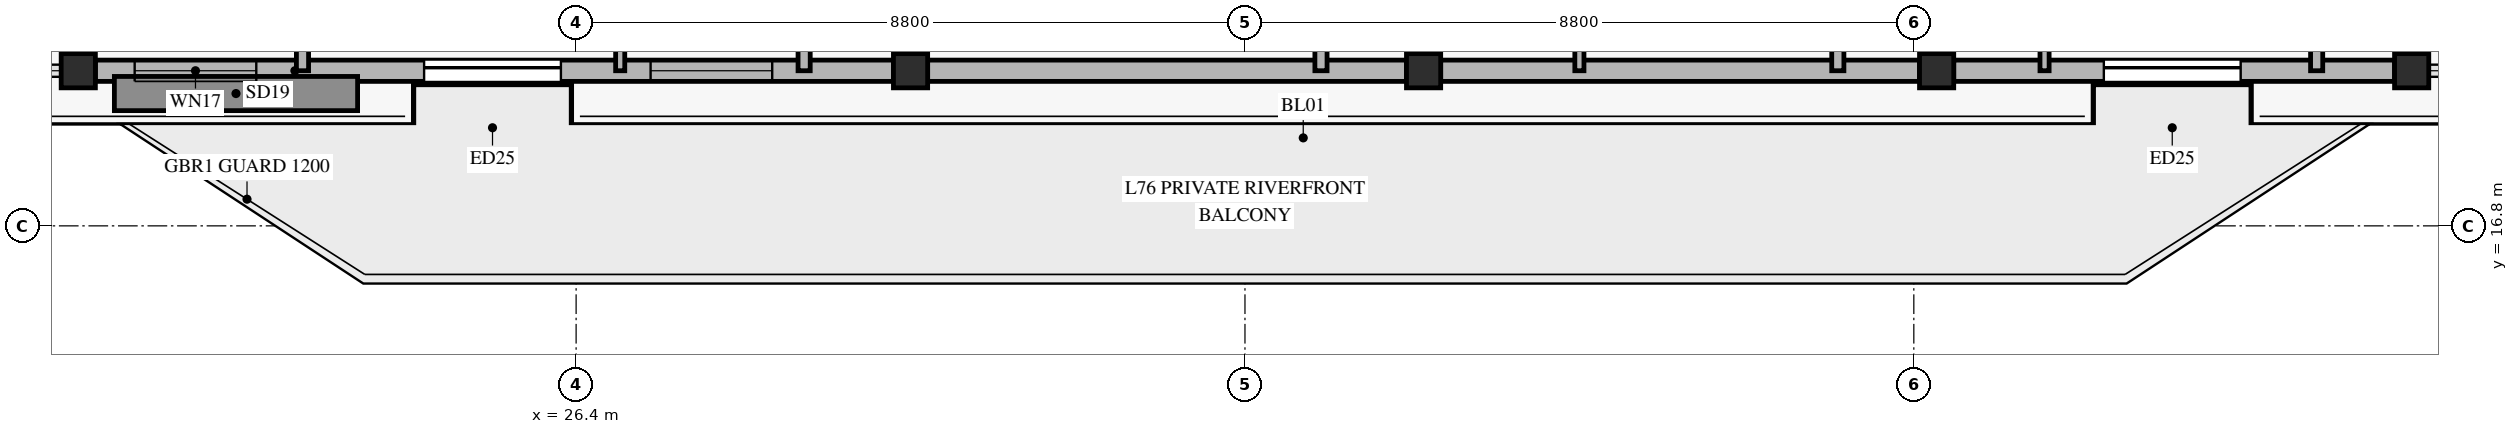
"""IFC4 building model, lengths in metres.
Left out: names, types, materials, properties, quantities, classifications, styles, units other than length and angle.
Written with IfcOpenShell. Run it as: python <this file> out.ifc"""

import sys

from ifc_helpers import new_model, si_unit, direction, frame, frame_2d, origin, origin_2d, place, context, subcontext, project, spatial, rectangle, hollow_rectangle, extrude, source, transform, mapped, element, fill, save


model = new_model("IFC4")
c1 = context("Model", 3, precision=1e-05, world=origin(), true_north=direction((0.0, 1.0)))
c2 = subcontext(c1, "Body", "Model", "MODEL_VIEW")
j1 = project(units=[si_unit("LENGTHUNIT", "METRE"), si_unit("PLANEANGLEUNIT", "RADIAN")], contexts=[c1])
p1 = place(None, origin())
s1 = spatial("IfcSite", under=j1, at=p1, CompositionType="ELEMENT")
p2 = place(p1, origin())
s2 = spatial("IfcBuilding", under=s1, at=p2, CompositionType="ELEMENT")
p3 = place(p2, frame((0.0, 0.0, 297.2)))
s3 = spatial("IfcBuildingStorey", under=s2, at=p3, CompositionType="ELEMENT", Elevation=297.2)
m1 = source(origin(), c2, "Body", "SweptSolid", [
    extrude(hollow_rectangle(XDim=0.45, YDim=0.45, WallThickness=0.022, at=origin_2d()), origin(), (0.0, 0.0, 1.0), 3.185),
])
for number, where, z_axis, x_axis in (
    (1, (19.85, 18.841, 0.0), (0.0, 0.0, 1.0), (1.0, 0.0, 0.0)),
    (2, (30.8, 18.841, 0.0), (0.0, 0.0, 1.0), (1.0, 0.0, 0.0)),
    (3, (37.55, 18.841, 0.0), (0.0, 0.0, 1.0), (1.0, 0.0, 0.0)),
    (4, (44.3, 18.841, 0.0), (0.0, 0.0, 1.0), (1.0, 0.0, 0.0)),
    (5, (50.55, 18.841, 0.0), (0.0, 0.0, 1.0), (1.0, 0.0, 0.0)),
):
    element("IfcColumn", number, at=place(p3, frame(where, z_axis=z_axis, x_axis=x_axis)), inside=s3, PredefinedType="COLUMN", context=c2, shape_type="MappedRepresentation", body=[
        mapped(m1, transform((0.0, 0.0, 0.0), x_axis=(1.0, 0.0, 0.0), y_axis=(0.0, 1.0, 0.0), z_axis=(0.0, 0.0, 1.0), scale=1.0)),
    ])
p4 = place(p3, frame((20.075, 18.841, 0.0), z_axis=(0.0, 0.0, 1.0), x_axis=(1.0, 0.0, 0.0)))
e6 = element("IfcWall", 6, at=p4, inside=s3, PredefinedType="SOLIDWALL", context=c2, shape_type="SweptSolid", body=[
    extrude(rectangle(XDim=10.5, YDim=0.28, at=frame_2d((5.25, 0.0))), origin(), (0.0, 0.0, 1.0), 2.815),
])
p5 = place(p4, frame((4.325, 0.0, 0.0)))
e7 = element("IfcOpeningElement", 7, at=p5, cuts=e6, PredefinedType="OPENING", context=c2, shape_type="SweptSolid", body=[
    extrude(rectangle(XDim=1.8, YDim=2.25, at=frame_2d((0.9, 1.125))), frame((0.0, 0.15, 0.0), z_axis=(0.0, -1.0, 0.0), x_axis=(1.0, 0.0, 0.0)), (0.0, 0.0, 1.0), 0.3),
])
p6 = place(p4, frame((0.517, 0.0, 0.45)))
e8 = element("IfcOpeningElement", 8, at=p6, cuts=e6, PredefinedType="OPENING", context=c2, shape_type="SweptSolid", body=[
    extrude(rectangle(XDim=1.6, YDim=2.0, at=frame_2d((0.8, 1.0))), frame((0.0, 0.15, 0.0), z_axis=(0.0, -1.0, 0.0), x_axis=(1.0, 0.0, 0.0)), (0.0, 0.0, 1.0), 0.3),
])
p7 = place(p4, frame((7.305, 0.0, 0.45)))
e9 = element("IfcOpeningElement", 9, at=p7, cuts=e6, PredefinedType="OPENING", context=c2, shape_type="SweptSolid", body=[
    extrude(rectangle(XDim=1.6, YDim=2.0, at=frame_2d((0.8, 1.0))), frame((0.0, 0.15, 0.0), z_axis=(0.0, -1.0, 0.0), x_axis=(1.0, 0.0, 0.0)), (0.0, 0.0, 1.0), 0.3),
])
for number, where, z_axis, x_axis in (
    (10, (31.025, 18.841, 0.0), (0.0, 0.0, 1.0), (1.0, 0.0, 0.0)),
    (11, (37.775, 18.841, 0.0), (0.0, 0.0, 1.0), (1.0, 0.0, 0.0)),
):
    element("IfcWall", number, at=place(p3, frame(where, z_axis=z_axis, x_axis=x_axis)), inside=s3, PredefinedType="SOLIDWALL", context=c2, shape_type="SweptSolid", body=[
        extrude(rectangle(XDim=6.3, YDim=0.28, at=frame_2d((3.15, 0.0))), origin(), (0.0, 0.0, 1.0), 2.815),
    ])
p8 = place(p3, frame((44.525, 18.841, 0.0), z_axis=(0.0, 0.0, 1.0), x_axis=(1.0, 0.0, 0.0)))
e12 = element("IfcWall", 12, at=p8, inside=s3, PredefinedType="SOLIDWALL", context=c2, shape_type="SweptSolid", body=[
    extrude(rectangle(XDim=5.8, YDim=0.28, at=frame_2d((2.9, 0.0))), origin(), (0.0, 0.0, 1.0), 2.815),
])
p9 = place(p8, frame((1.975, 0.0, 0.0)))
e13 = element("IfcOpeningElement", 13, at=p9, cuts=e12, PredefinedType="OPENING", context=c2, shape_type="SweptSolid", body=[
    extrude(rectangle(XDim=1.8, YDim=2.25, at=frame_2d((0.9, 1.125))), frame((0.0, 0.15, 0.0), z_axis=(0.0, -1.0, 0.0), x_axis=(1.0, 0.0, 0.0)), (0.0, 0.0, 1.0), 0.3),
])
for number, where, z_axis, x_axis in (
    (14, (22.8, 18.841, 0.0), (0.0, 0.0, 1.0), (0.0, 1.0, 0.0)),
    (15, (29.4, 18.841, 0.0), (0.0, 0.0, 1.0), (0.0, 1.0, 0.0)),
    (16, (36.2, 18.841, 0.0), (0.0, 0.0, 1.0), (0.0, 1.0, 0.0)),
    (17, (43.0, 18.841, 0.0), (0.0, 0.0, 1.0), (0.0, 1.0, 0.0)),
    (18, (49.3, 18.841, 0.0), (0.0, 0.0, 1.0), (0.0, 1.0, 0.0)),
):
    element("IfcWall", number, at=place(p3, frame(where, z_axis=z_axis, x_axis=x_axis)), inside=s3, PredefinedType="PARTITIONING", context=c2, shape_type="SweptSolid", body=[
        extrude(rectangle(XDim=15.509, YDim=0.16, at=frame_2d((7.754, 0.0))), origin(), (0.0, 0.0, 1.0), 2.77),
    ])
p10 = place(p3, frame((26.98, 18.841, 0.0), z_axis=(0.0, 0.0, 1.0), x_axis=(0.0, 1.0, 0.0)))
e19 = element("IfcWall", 19, at=p10, inside=s3, PredefinedType="PARTITIONING", context=c2, shape_type="SweptSolid", body=[
    extrude(rectangle(XDim=12.859, YDim=0.12, at=frame_2d((6.429, 0.0))), origin(), (0.0, 0.0, 1.0), 2.77),
])
p11 = place(p10, frame((0.8, 0.0, 0.0)))
e20 = element("IfcOpeningElement", 20, at=p11, cuts=e19, PredefinedType="OPENING", context=c2, shape_type="SweptSolid", body=[
    extrude(rectangle(XDim=0.95, YDim=2.1, at=frame_2d((0.475, 1.05))), frame((0.0, 0.07, 0.0), z_axis=(0.0, -1.0, 0.0), x_axis=(1.0, 0.0, 0.0)), (0.0, 0.0, 1.0), 0.14),
])
p12 = place(p3, frame((39.6, 18.841, 0.0), z_axis=(0.0, 0.0, 1.0), x_axis=(0.0, 1.0, 0.0)))
e21 = element("IfcWall", 21, at=p12, inside=s3, PredefinedType="PARTITIONING", context=c2, shape_type="SweptSolid", body=[
    extrude(rectangle(XDim=12.859, YDim=0.12, at=frame_2d((6.429, 0.0))), origin(), (0.0, 0.0, 1.0), 2.77),
])
p13 = place(p12, frame((1.59, 0.0, 0.0)))
e22 = element("IfcOpeningElement", 22, at=p13, cuts=e21, PredefinedType="OPENING", context=c2, shape_type="SweptSolid", body=[
    extrude(rectangle(XDim=0.95, YDim=2.1, at=frame_2d((0.475, 1.05))), frame((0.0, 0.07, 0.0), z_axis=(0.0, -1.0, 0.0), x_axis=(1.0, 0.0, 0.0)), (0.0, 0.0, 1.0), 0.14),
])
p14 = place(p12, frame((9.299, 0.0, 0.0)))
e23 = element("IfcOpeningElement", 23, at=p14, cuts=e21, PredefinedType="OPENING", context=c2, shape_type="SweptSolid", body=[
    extrude(rectangle(XDim=0.95, YDim=2.1, at=frame_2d((0.475, 1.05))), frame((0.0, 0.07, 0.0), z_axis=(0.0, -1.0, 0.0), x_axis=(1.0, 0.0, 0.0)), (0.0, 0.0, 1.0), 0.14),
])
p15 = place(p3, frame((45.72, 18.841, 0.0), z_axis=(0.0, 0.0, 1.0), x_axis=(0.0, 1.0, 0.0)))
e24 = element("IfcWall", 24, at=p15, inside=s3, PredefinedType="PARTITIONING", context=c2, shape_type="SweptSolid", body=[
    extrude(rectangle(XDim=12.859, YDim=0.12, at=frame_2d((6.429, 0.0))), origin(), (0.0, 0.0, 1.0), 2.77),
])
p16 = place(p15, frame((0.67, 0.0, 0.0)))
e25 = element("IfcOpeningElement", 25, at=p16, cuts=e24, PredefinedType="OPENING", context=c2, shape_type="SweptSolid", body=[
    extrude(rectangle(XDim=0.95, YDim=2.1, at=frame_2d((0.475, 1.05))), frame((0.0, 0.07, 0.0), z_axis=(0.0, -1.0, 0.0), x_axis=(1.0, 0.0, 0.0)), (0.0, 0.0, 1.0), 0.14),
])
p17 = place(p15, frame((9.299, 0.0, 0.0)))
e26 = element("IfcOpeningElement", 26, at=p17, cuts=e24, PredefinedType="OPENING", context=c2, shape_type="SweptSolid", body=[
    extrude(rectangle(XDim=0.95, YDim=2.1, at=frame_2d((0.475, 1.05))), frame((0.0, 0.07, 0.0), z_axis=(0.0, -1.0, 0.0), x_axis=(1.0, 0.0, 0.0)), (0.0, 0.0, 1.0), 0.14),
])
m2 = source(origin(), c2, "Body", "SweptSolid", [
    extrude(rectangle(XDim=1.8, YDim=2.25, at=frame_2d((0.9, 1.125))), frame((0.0, 0.025, 0.0), z_axis=(0.0, -1.0, 0.0), x_axis=(1.0, 0.0, 0.0)), (0.0, 0.0, 1.0), 0.05),
])
p18 = place(p5, origin())
e27 = element("IfcDoor", 27, at=p18, inside=s3, OperationType="SLIDING_TO_LEFT", PredefinedType="DOOR", context=c2, shape_type="MappedRepresentation", body=[
    mapped(m2, transform((0.0, 0.0, 0.0), x_axis=(1.0, 0.0, 0.0), y_axis=(0.0, 1.0, 0.0), z_axis=(0.0, 0.0, 1.0), scale=1.0)),
])
fill(e7, e27)
m3 = source(origin(), c2, "Body", "SweptSolid", [
    extrude(rectangle(XDim=1.6, YDim=2.0, at=frame_2d((0.8, 1.0))), frame((0.0, 0.03, 0.0), z_axis=(0.0, -1.0, 0.0), x_axis=(1.0, 0.0, 0.0)), (0.0, 0.0, 1.0), 0.06),
])
p19 = place(p6, origin())
e28 = element("IfcWindow", 28, at=p19, inside=s3, PartitioningType="SINGLE_PANEL", PredefinedType="WINDOW", context=c2, shape_type="MappedRepresentation", body=[
    mapped(m3, transform((0.0, 0.0, 0.0), x_axis=(1.0, 0.0, 0.0), y_axis=(0.0, 1.0, 0.0), z_axis=(0.0, 0.0, 1.0), scale=1.0)),
])
fill(e8, e28)
p20 = place(p7, origin())
e29 = element("IfcWindow", 29, at=p20, inside=s3, PartitioningType="SINGLE_PANEL", PredefinedType="WINDOW", context=c2, shape_type="MappedRepresentation", body=[
    mapped(m3, transform((0.0, 0.0, 0.0), x_axis=(1.0, 0.0, 0.0), y_axis=(0.0, 1.0, 0.0), z_axis=(0.0, 0.0, 1.0), scale=1.0)),
])
fill(e9, e29)
p21 = place(p9, origin())
e30 = element("IfcDoor", 30, at=p21, inside=s3, OperationType="SLIDING_TO_LEFT", PredefinedType="DOOR", context=c2, shape_type="MappedRepresentation", body=[
    mapped(m2, transform((0.0, 0.0, 0.0), x_axis=(1.0, 0.0, 0.0), y_axis=(0.0, 1.0, 0.0), z_axis=(0.0, 0.0, 1.0), scale=1.0)),
])
fill(e13, e30)
save(model, sys.argv[1])
